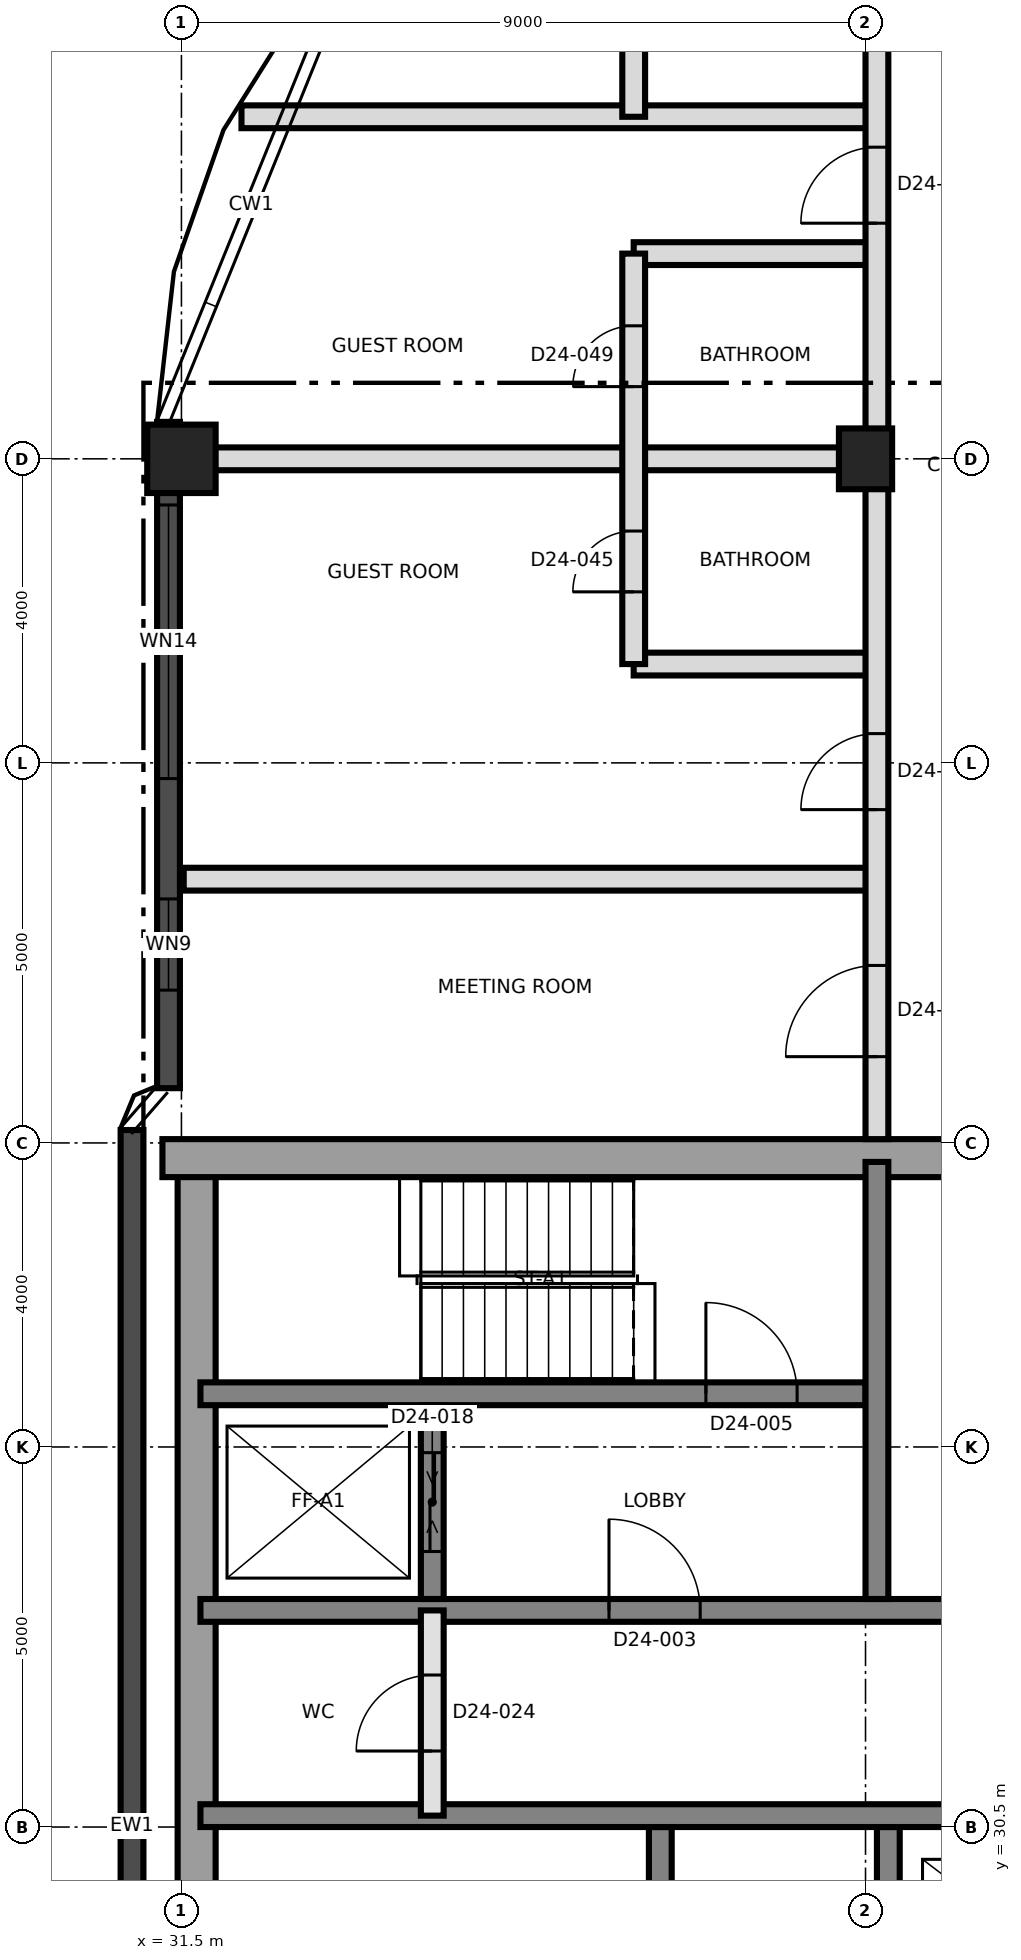
"""IFC4 building model, lengths in metres.
Left out: names, types, materials, properties, quantities, classifications, styles, units other than length and angle.
Written with IfcOpenShell. Run it as: python <this file> out.ifc"""

import sys

from ifc_helpers import new_model, si_unit, direction, frame, frame_2d, origin, origin_2d, place, context, subcontext, project, spatial, rectangle, extrude, element, fill, save


model = new_model("IFC4")
c1 = context("Model", 3, precision=1e-05, world=origin(), true_north=direction((0.0, 1.0)))
c2 = subcontext(c1, "Body", "Model", "MODEL_VIEW")
j1 = project(units=[si_unit("LENGTHUNIT", "METRE"), si_unit("PLANEANGLEUNIT", "RADIAN")], contexts=[c1])
p1 = place(None, origin())
s1 = spatial("IfcSite", under=j1, at=p1, CompositionType="ELEMENT")
p2 = place(p1, origin())
s2 = spatial("IfcBuilding", under=s1, at=p2, CompositionType="ELEMENT")
p3 = place(p2, frame((0.0, 0.0, 221.7)))
s3 = spatial("IfcBuildingStorey", under=s2, at=p3, CompositionType="ELEMENT", Elevation=221.7)
p4 = place(p3, frame((31.7, 21.75, 0.0), z_axis=(0.0, 0.0, 1.0), x_axis=(0.0, 1.0, 0.0)))
e1 = element("IfcWall", 1, at=p4, inside=s3, PredefinedType="SHEAR", context=c2, shape_type="SweptSolid", body=[
    extrude(rectangle(XDim=17.5, YDim=0.5, at=frame_2d((8.75, 0.0))), origin(), (0.0, 0.0, 1.0), 3.7),
])
p5 = place(p3, frame((31.25, 39.3, 0.0), z_axis=(0.0, 0.0, 1.0), x_axis=(1.0, 0.0, 0.0)))
e2 = element("IfcWall", 2, at=p5, inside=s3, PredefinedType="SHEAR", context=c2, shape_type="SweptSolid", body=[
    extrude(rectangle(XDim=27.0, YDim=0.5, at=frame_2d((13.5, 0.0))), origin(), (0.0, 0.0, 1.0), 3.7),
])
p6 = place(p5, frame((10.45, 0.0, 0.0)))
e3 = element("IfcOpeningElement", 3, at=p6, cuts=e2, PredefinedType="OPENING", context=c2, shape_type="SweptSolid", body=[
    extrude(rectangle(XDim=1.2, YDim=2.1, at=frame_2d((0.6, 1.05))), frame((0.0, 0.26, 0.0), z_axis=(0.0, -1.0, 0.0), x_axis=(1.0, 0.0, 0.0)), (0.0, 0.0, 1.0), 0.52),
])
p7 = place(p3, frame((37.8, 21.75, 0.0), z_axis=(0.0, 0.0, 1.0), x_axis=(0.0, 1.0, 0.0)))
e4 = element("IfcWall", 4, at=p7, inside=s3, PredefinedType="SHEAR", context=c2, shape_type="SweptSolid", body=[
    extrude(rectangle(XDim=8.75, YDim=0.3, at=frame_2d((4.375, 0.0))), origin(), (0.0, 0.0, 1.0), 3.7),
])
p8 = place(p7, frame((5.525, 0.0, 0.0)))
e5 = element("IfcOpeningElement", 5, at=p8, cuts=e4, PredefinedType="OPENING", context=c2, shape_type="SweptSolid", body=[
    extrude(rectangle(XDim=1.0, YDim=2.1, at=frame_2d((0.5, 1.05))), frame((0.0, 0.16, 0.0), z_axis=(0.0, -1.0, 0.0), x_axis=(1.0, 0.0, 0.0)), (0.0, 0.0, 1.0), 0.32),
])
p9 = place(p3, frame((40.8, 21.75, 0.0), z_axis=(0.0, 0.0, 1.0), x_axis=(0.0, 1.0, 0.0)))
e6 = element("IfcWall", 6, at=p9, inside=s3, PredefinedType="SHEAR", context=c2, shape_type="SweptSolid", body=[
    extrude(rectangle(XDim=8.75, YDim=0.3, at=frame_2d((4.375, 0.0))), origin(), (0.0, 0.0, 1.0), 3.7),
])
p10 = place(p9, frame((3.9, 0.0, 0.0)))
e7 = element("IfcOpeningElement", 7, at=p10, cuts=e6, PredefinedType="OPENING", context=c2, shape_type="SweptSolid", body=[
    extrude(rectangle(XDim=1.5, YDim=2.1, at=frame_2d((0.75, 1.05))), frame((0.0, 0.16, 0.0), z_axis=(0.0, -1.0, 0.0), x_axis=(1.0, 0.0, 0.0)), (0.0, 0.0, 1.0), 0.32),
])
p11 = place(p3, frame((31.75, 30.65, 0.0), z_axis=(0.0, 0.0, 1.0), x_axis=(1.0, 0.0, 0.0)))
e8 = element("IfcWall", 8, at=p11, inside=s3, PredefinedType="SHEAR", context=c2, shape_type="SweptSolid", body=[
    extrude(rectangle(XDim=26.5, YDim=0.3, at=frame_2d((13.25, 0.0))), origin(), (0.0, 0.0, 1.0), 3.7),
])
p12 = place(p11, frame((24.75, 0.0, 0.0)))
e9 = element("IfcOpeningElement", 9, at=p12, cuts=e8, PredefinedType="OPENING", context=c2, shape_type="SweptSolid", body=[
    extrude(rectangle(XDim=1.0, YDim=2.1, at=frame_2d((0.5, 1.05))), frame((0.0, 0.16, 0.0), z_axis=(0.0, -1.0, 0.0), x_axis=(1.0, 0.0, 0.0)), (0.0, 0.0, 1.0), 0.32),
])
p13 = place(p3, frame((31.75, 33.35, 0.0), z_axis=(0.0, 0.0, 1.0), x_axis=(1.0, 0.0, 0.0)))
e10 = element("IfcWall", 10, at=p13, inside=s3, PredefinedType="SHEAR", context=c2, shape_type="SweptSolid", body=[
    extrude(rectangle(XDim=26.5, YDim=0.3, at=frame_2d((13.25, 0.0))), origin(), (0.0, 0.0, 1.0), 3.7),
])
p14 = place(p13, frame((13.9, 0.0, 0.0)))
e11 = element("IfcOpeningElement", 11, at=p14, cuts=e10, PredefinedType="OPENING", context=c2, shape_type="SweptSolid", body=[
    extrude(rectangle(XDim=1.4, YDim=2.1, at=frame_2d((0.7, 1.05))), frame((0.0, 0.16, 0.0), z_axis=(0.0, -1.0, 0.0), x_axis=(1.0, 0.0, 0.0)), (0.0, 0.0, 1.0), 0.32),
])
p15 = place(p13, frame((5.375, 0.0, 0.0)))
e12 = element("IfcOpeningElement", 12, at=p15, cuts=e10, PredefinedType="OPENING", context=c2, shape_type="SweptSolid", body=[
    extrude(rectangle(XDim=1.2, YDim=2.1, at=frame_2d((0.6, 1.05))), frame((0.0, 0.16, 0.0), z_axis=(0.0, -1.0, 0.0), x_axis=(1.0, 0.0, 0.0)), (0.0, 0.0, 1.0), 0.32),
])
p16 = place(p13, frame((19.925, 0.0, 0.0)))
e13 = element("IfcOpeningElement", 13, at=p16, cuts=e10, PredefinedType="OPENING", context=c2, shape_type="SweptSolid", body=[
    extrude(rectangle(XDim=1.2, YDim=2.1, at=frame_2d((0.6, 1.05))), frame((0.0, 0.16, 0.0), z_axis=(0.0, -1.0, 0.0), x_axis=(1.0, 0.0, 0.0)), (0.0, 0.0, 1.0), 0.32),
])
p17 = place(p3, frame((31.75, 36.2, 0.0), z_axis=(0.0, 0.0, 1.0), x_axis=(1.0, 0.0, 0.0)))
e14 = element("IfcWall", 14, at=p17, inside=s3, PredefinedType="SHEAR", context=c2, shape_type="SweptSolid", body=[
    extrude(rectangle(XDim=8.75, YDim=0.3, at=frame_2d((4.375, 0.0))), origin(), (0.0, 0.0, 1.0), 3.7),
])
p18 = place(p17, frame((6.65, 0.0, 0.0)))
e15 = element("IfcOpeningElement", 15, at=p18, cuts=e14, PredefinedType="OPENING", context=c2, shape_type="SweptSolid", body=[
    extrude(rectangle(XDim=1.2, YDim=2.1, at=frame_2d((0.6, 1.05))), frame((0.0, 0.16, 0.0), z_axis=(0.0, -1.0, 0.0), x_axis=(1.0, 0.0, 0.0)), (0.0, 0.0, 1.0), 0.32),
])
p19 = place(p3, frame((40.65, 33.5, 0.0), z_axis=(0.0, 0.0, 1.0), x_axis=(0.0, 1.0, 0.0)))
e16 = element("IfcWall", 16, at=p19, inside=s3, PredefinedType="SHEAR", context=c2, shape_type="SweptSolid", body=[
    extrude(rectangle(XDim=5.75, YDim=0.3, at=frame_2d((2.875, 0.0))), origin(), (0.0, 0.0, 1.0), 3.7),
])
p20 = place(p3, frame((34.8, 33.5, 0.0), z_axis=(0.0, 0.0, 1.0), x_axis=(0.0, 1.0, 0.0)))
e17 = element("IfcWall", 17, at=p20, inside=s3, PredefinedType="SHEAR", context=c2, shape_type="SweptSolid", body=[
    extrude(rectangle(XDim=2.55, YDim=0.3, at=frame_2d((1.275, 0.0))), origin(), (0.0, 0.0, 1.0), 3.7),
])
p21 = place(p20, frame((0.625, 0.0, 0.0)))
e18 = element("IfcOpeningElement", 18, at=p21, cuts=e17, PredefinedType="OPENING", context=c2, shape_type="SweptSolid", body=[
    extrude(rectangle(XDim=1.3, YDim=2.4, at=frame_2d((0.65, 1.2))), frame((0.0, 0.16, 0.0), z_axis=(0.0, -1.0, 0.0), x_axis=(1.0, 0.0, 0.0)), (0.0, 0.0, 1.0), 0.32),
])
p22 = place(p3, frame((31.5, 48.5, 0.0), z_axis=(0.0, 0.0, 1.0), x_axis=(1.0, 0.0, 0.0)))
e19 = element("IfcColumn", 19, at=p22, inside=s3, PredefinedType="COLUMN", context=c2, shape_type="SweptSolid", body=[
    extrude(rectangle(XDim=0.9, YDim=0.9, at=origin_2d()), origin(), (0.0, 0.0, 1.0), 3.7),
])
p23 = place(p3, frame((40.5, 48.5, 0.0), z_axis=(0.0, 0.0, 1.0), x_axis=(0.0, 1.0, 0.0)))
e20 = element("IfcColumn", 20, at=p23, inside=s3, PredefinedType="COLUMN", context=c2, shape_type="SweptSolid", body=[
    extrude(rectangle(XDim=0.8, YDim=0.7, at=origin_2d()), origin(), (0.0, 0.0, 1.0), 3.7),
])
p24 = place(p3, frame((31.33, 48.986, 0.0), z_axis=(0.0, 0.0, 1.0), x_axis=(0.0, -1.0, 0.0)))
e21 = element("IfcWall", 21, at=p24, inside=s3, PredefinedType="SOLIDWALL", context=c2, shape_type="SweptSolid", body=[
    extrude(rectangle(XDim=8.766, YDim=0.3, at=frame_2d((4.383, 0.0))), origin(), (0.0, 0.0, 1.0), 3.4),
])
p25 = place(p24, frame((1.093, 0.0, 0.9)))
e22 = element("IfcOpeningElement", 22, at=p25, cuts=e21, PredefinedType="OPENING", context=c2, shape_type="SweptSolid", body=[
    extrude(rectangle(XDim=3.6, YDim=1.7, at=frame_2d((1.8, 0.85))), frame((0.0, 0.16, 0.0), z_axis=(0.0, -1.0, 0.0), x_axis=(1.0, 0.0, 0.0)), (0.0, 0.0, 1.0), 0.32),
])
p26 = place(p24, frame((6.276, 0.0, 0.9)))
e23 = element("IfcOpeningElement", 23, at=p26, cuts=e21, PredefinedType="OPENING", context=c2, shape_type="SweptSolid", body=[
    extrude(rectangle(XDim=1.2, YDim=1.5, at=frame_2d((0.6, 0.75))), frame((0.0, 0.16, 0.0), z_axis=(0.0, -1.0, 0.0), x_axis=(1.0, 0.0, 0.0)), (0.0, 0.0, 1.0), 0.32),
])
p27 = place(p3, frame((30.85, 39.67, 0.0), z_axis=(0.0, 0.0, 1.0), x_axis=(0.0, -1.0, 0.0)))
e24 = element("IfcWall", 24, at=p27, inside=s3, PredefinedType="SOLIDWALL", context=c2, shape_type="SweptSolid", body=[
    extrude(rectangle(XDim=18.31, YDim=0.3, at=frame_2d((9.155, 0.0))), origin(), (0.0, 0.0, 1.0), 3.4),
])
p28 = place(p3, frame((34.8, 30.65, 0.0), z_axis=(0.0, 0.0, 1.0), x_axis=(0.0, 1.0, 0.0)))
e25 = element("IfcWall", 25, at=p28, inside=s3, PredefinedType="SOLIDWALL", context=c2, shape_type="SweptSolid", body=[
    extrude(rectangle(XDim=2.7, YDim=0.3, at=frame_2d((1.35, 0.0))), origin(), (0.0, 0.0, 1.0), 3.4),
])
p29 = place(p28, frame((0.85, 0.0, 0.0)))
e26 = element("IfcOpeningElement", 26, at=p29, cuts=e25, PredefinedType="OPENING", context=c2, shape_type="SweptSolid", body=[
    extrude(rectangle(XDim=1.0, YDim=2.1, at=frame_2d((0.5, 1.05))), frame((0.0, 0.16, 0.0), z_axis=(0.0, -1.0, 0.0), x_axis=(1.0, 0.0, 0.0)), (0.0, 0.0, 1.0), 0.32),
])
p30 = place(p3, frame((31.53, 42.97, 0.0), z_axis=(0.0, 0.0, 1.0), x_axis=(1.0, 0.0, 0.0)))
e27 = element("IfcWall", 27, at=p30, inside=s3, PredefinedType="PARTITIONING", context=c2, shape_type="SweptSolid", body=[
    extrude(rectangle(XDim=9.12, YDim=0.3, at=frame_2d((4.56, 0.0))), origin(), (0.0, 0.0, 1.0), 3.4),
])
p31 = place(p3, frame((37.45, 45.8, 0.0), z_axis=(0.0, 0.0, 1.0), x_axis=(1.0, 0.0, 0.0)))
e28 = element("IfcWall", 28, at=p31, inside=s3, PredefinedType="PARTITIONING", context=c2, shape_type="SweptSolid", body=[
    extrude(rectangle(XDim=3.2, YDim=0.3, at=frame_2d((1.6, 0.0))), origin(), (0.0, 0.0, 1.0), 3.4),
])
p32 = place(p3, frame((31.53, 48.5, 0.0), z_axis=(0.0, 0.0, 1.0), x_axis=(1.0, 0.0, 0.0)))
e29 = element("IfcWall", 29, at=p32, inside=s3, PredefinedType="PARTITIONING", context=c2, shape_type="SweptSolid", body=[
    extrude(rectangle(XDim=9.12, YDim=0.3, at=frame_2d((4.56, 0.0))), origin(), (0.0, 0.0, 1.0), 3.4),
])
p33 = place(p3, frame((37.45, 51.2, 0.0), z_axis=(0.0, 0.0, 1.0), x_axis=(1.0, 0.0, 0.0)))
e30 = element("IfcWall", 30, at=p33, inside=s3, PredefinedType="PARTITIONING", context=c2, shape_type="SweptSolid", body=[
    extrude(rectangle(XDim=3.2, YDim=0.3, at=frame_2d((1.6, 0.0))), origin(), (0.0, 0.0, 1.0), 3.4),
])
p34 = place(p3, frame((32.29, 53.0, 0.0), z_axis=(0.0, 0.0, 1.0), x_axis=(1.0, 0.0, 0.0)))
e31 = element("IfcWall", 31, at=p34, inside=s3, PredefinedType="PARTITIONING", context=c2, shape_type="SweptSolid", body=[
    extrude(rectangle(XDim=8.36, YDim=0.3, at=frame_2d((4.18, 0.0))), origin(), (0.0, 0.0, 1.0), 3.4),
])
p35 = place(p3, frame((37.45, 45.8, 0.0), z_axis=(0.0, 0.0, 1.0), x_axis=(0.0, 1.0, 0.0)))
e32 = element("IfcWall", 32, at=p35, inside=s3, PredefinedType="PARTITIONING", context=c2, shape_type="SweptSolid", body=[
    extrude(rectangle(XDim=5.4, YDim=0.3, at=frame_2d((2.7, 0.0))), origin(), (0.0, 0.0, 1.0), 3.4),
])
p36 = place(p35, frame((0.95, 0.0, 0.0)))
e33 = element("IfcOpeningElement", 33, at=p36, cuts=e32, PredefinedType="OPENING", context=c2, shape_type="SweptSolid", body=[
    extrude(rectangle(XDim=0.8, YDim=2.1, at=frame_2d((0.4, 1.05))), frame((0.0, 0.16, 0.0), z_axis=(0.0, -1.0, 0.0), x_axis=(1.0, 0.0, 0.0)), (0.0, 0.0, 1.0), 0.32),
])
p37 = place(p35, frame((3.65, 0.0, 0.0)))
e34 = element("IfcOpeningElement", 34, at=p37, cuts=e32, PredefinedType="OPENING", context=c2, shape_type="SweptSolid", body=[
    extrude(rectangle(XDim=0.8, YDim=2.1, at=frame_2d((0.4, 1.05))), frame((0.0, 0.16, 0.0), z_axis=(0.0, -1.0, 0.0), x_axis=(1.0, 0.0, 0.0)), (0.0, 0.0, 1.0), 0.32),
])
p38 = place(p3, frame((37.45, 53.0, 0.0), z_axis=(0.0, 0.0, 1.0), x_axis=(0.0, 1.0, 0.0)))
e35 = element("IfcWall", 35, at=p38, inside=s3, PredefinedType="PARTITIONING", context=c2, shape_type="SweptSolid", body=[
    extrude(rectangle(XDim=2.7, YDim=0.3, at=frame_2d((1.35, 0.0))), origin(), (0.0, 0.0, 1.0), 3.4),
])
p39 = place(p38, frame((0.95, 0.0, 0.0)))
e36 = element("IfcOpeningElement", 36, at=p39, cuts=e35, PredefinedType="OPENING", context=c2, shape_type="SweptSolid", body=[
    extrude(rectangle(XDim=0.8, YDim=2.1, at=frame_2d((0.4, 1.05))), frame((0.0, 0.16, 0.0), z_axis=(0.0, -1.0, 0.0), x_axis=(1.0, 0.0, 0.0)), (0.0, 0.0, 1.0), 0.32),
])
p40 = place(p3, frame((40.65, 39.55, 0.0), z_axis=(0.0, 0.0, 1.0), x_axis=(0.0, 1.0, 0.0)))
e37 = element("IfcWall", 37, at=p40, inside=s3, PredefinedType="PARTITIONING", context=c2, shape_type="SweptSolid", body=[
    extrude(rectangle(XDim=17.92, YDim=0.3, at=frame_2d((8.96, 0.0))), origin(), (0.0, 0.0, 1.0), 3.4),
])
p41 = place(p40, frame((1.085, 0.0, 0.0)))
e38 = element("IfcOpeningElement", 38, at=p41, cuts=e37, PredefinedType="OPENING", context=c2, shape_type="SweptSolid", body=[
    extrude(rectangle(XDim=1.2, YDim=2.1, at=frame_2d((0.6, 1.05))), frame((0.0, 0.16, 0.0), z_axis=(0.0, -1.0, 0.0), x_axis=(1.0, 0.0, 0.0)), (0.0, 0.0, 1.0), 0.32),
])
p42 = place(p40, frame((4.335, 0.0, 0.0)))
e39 = element("IfcOpeningElement", 39, at=p42, cuts=e37, PredefinedType="OPENING", context=c2, shape_type="SweptSolid", body=[
    extrude(rectangle(XDim=1.0, YDim=2.1, at=frame_2d((0.5, 1.05))), frame((0.0, 0.16, 0.0), z_axis=(0.0, -1.0, 0.0), x_axis=(1.0, 0.0, 0.0)), (0.0, 0.0, 1.0), 0.32),
])
p43 = place(p40, frame((12.05, 0.0, 0.0)))
e40 = element("IfcOpeningElement", 40, at=p43, cuts=e37, PredefinedType="OPENING", context=c2, shape_type="SweptSolid", body=[
    extrude(rectangle(XDim=1.0, YDim=2.1, at=frame_2d((0.5, 1.05))), frame((0.0, 0.16, 0.0), z_axis=(0.0, -1.0, 0.0), x_axis=(1.0, 0.0, 0.0)), (0.0, 0.0, 1.0), 0.32),
])
p44 = place(p40, frame((16.45, 0.0, 0.0)))
e41 = element("IfcOpeningElement", 41, at=p44, cuts=e37, PredefinedType="OPENING", context=c2, shape_type="SweptSolid", body=[
    extrude(rectangle(XDim=1.0, YDim=2.1, at=frame_2d((0.5, 1.05))), frame((0.0, 0.16, 0.0), z_axis=(0.0, -1.0, 0.0), x_axis=(1.0, 0.0, 0.0)), (0.0, 0.0, 1.0), 0.32),
])
p45 = place(p25, origin())
e42 = element("IfcWindow", 42, at=p45, inside=s3, PartitioningType="SINGLE_PANEL", PredefinedType="WINDOW", context=c2, shape_type="SweptSolid", body=[
    extrude(rectangle(XDim=3.6, YDim=1.7, at=frame_2d((1.8, 0.85))), frame((0.0, 0.03, 0.0), z_axis=(0.0, -1.0, 0.0), x_axis=(1.0, 0.0, 0.0)), (0.0, 0.0, 1.0), 0.06),
])
fill(e22, e42)
p46 = place(p26, origin())
e43 = element("IfcWindow", 43, at=p46, inside=s3, PartitioningType="SINGLE_PANEL", PredefinedType="WINDOW", context=c2, shape_type="SweptSolid", body=[
    extrude(rectangle(XDim=1.2, YDim=1.5, at=frame_2d((0.6, 0.75))), frame((0.0, 0.03, 0.0), z_axis=(0.0, -1.0, 0.0), x_axis=(1.0, 0.0, 0.0)), (0.0, 0.0, 1.0), 0.06),
])
fill(e23, e43)
p47 = place(p15, origin())
e44 = element("IfcDoor", 44, at=p47, inside=s3, OperationType="SINGLE_SWING_LEFT", PredefinedType="DOOR", context=c2, shape_type="SweptSolid", body=[
    extrude(rectangle(XDim=1.2, YDim=2.1, at=frame_2d((0.6, 1.05))), frame((0.0, 0.025, 0.0), z_axis=(0.0, -1.0, 0.0), x_axis=(1.0, 0.0, 0.0)), (0.0, 0.0, 1.0), 0.05),
])
fill(e12, e44)
p48 = place(p18, origin())
e45 = element("IfcDoor", 45, at=p48, inside=s3, OperationType="SINGLE_SWING_RIGHT", PredefinedType="DOOR", context=c2, shape_type="SweptSolid", body=[
    extrude(rectangle(XDim=1.2, YDim=2.1, at=frame_2d((0.6, 1.05))), frame((0.0, 0.025, 0.0), z_axis=(0.0, -1.0, 0.0), x_axis=(1.0, 0.0, 0.0)), (0.0, 0.0, 1.0), 0.05),
])
fill(e15, e45)
p49 = place(p21, origin())
e46 = element("IfcDoor", 46, at=p49, inside=s3, OperationType="SLIDING_TO_LEFT", PredefinedType="DOOR", context=c2, shape_type="SweptSolid", body=[
    extrude(rectangle(XDim=1.3, YDim=2.4, at=frame_2d((0.65, 1.2))), frame((0.0, 0.025, 0.0), z_axis=(0.0, -1.0, 0.0), x_axis=(1.0, 0.0, 0.0)), (0.0, 0.0, 1.0), 0.05),
])
fill(e18, e46)
p50 = place(p29, origin())
e47 = element("IfcDoor", 47, at=p50, inside=s3, OperationType="SINGLE_SWING_LEFT", PredefinedType="DOOR", context=c2, shape_type="SweptSolid", body=[
    extrude(rectangle(XDim=1.0, YDim=2.1, at=frame_2d((0.5, 1.05))), frame((0.0, 0.025, 0.0), z_axis=(0.0, -1.0, 0.0), x_axis=(1.0, 0.0, 0.0)), (0.0, 0.0, 1.0), 0.05),
])
fill(e26, e47)
p51 = place(p41, origin())
e48 = element("IfcDoor", 48, at=p51, inside=s3, OperationType="SINGLE_SWING_LEFT", PredefinedType="DOOR", context=c2, shape_type="SweptSolid", body=[
    extrude(rectangle(XDim=1.2, YDim=2.1, at=frame_2d((0.6, 1.05))), frame((0.0, 0.025, 0.0), z_axis=(0.0, -1.0, 0.0), x_axis=(1.0, 0.0, 0.0)), (0.0, 0.0, 1.0), 0.05),
])
fill(e38, e48)
p52 = place(p36, origin())
e49 = element("IfcDoor", 49, at=p52, inside=s3, OperationType="SINGLE_SWING_LEFT", PredefinedType="DOOR", context=c2, shape_type="SweptSolid", body=[
    extrude(rectangle(XDim=0.8, YDim=2.1, at=frame_2d((0.4, 1.05))), frame((0.0, 0.025, 0.0), z_axis=(0.0, -1.0, 0.0), x_axis=(1.0, 0.0, 0.0)), (0.0, 0.0, 1.0), 0.05),
])
fill(e33, e49)
p53 = place(p42, origin())
e50 = element("IfcDoor", 50, at=p53, inside=s3, OperationType="SINGLE_SWING_RIGHT", PredefinedType="DOOR", context=c2, shape_type="SweptSolid", body=[
    extrude(rectangle(XDim=1.0, YDim=2.1, at=frame_2d((0.5, 1.05))), frame((0.0, 0.025, 0.0), z_axis=(0.0, -1.0, 0.0), x_axis=(1.0, 0.0, 0.0)), (0.0, 0.0, 1.0), 0.05),
])
fill(e39, e50)
p54 = place(p37, origin())
e51 = element("IfcDoor", 51, at=p54, inside=s3, OperationType="SINGLE_SWING_LEFT", PredefinedType="DOOR", context=c2, shape_type="SweptSolid", body=[
    extrude(rectangle(XDim=0.8, YDim=2.1, at=frame_2d((0.4, 1.05))), frame((0.0, 0.025, 0.0), z_axis=(0.0, -1.0, 0.0), x_axis=(1.0, 0.0, 0.0)), (0.0, 0.0, 1.0), 0.05),
])
fill(e34, e51)
p55 = place(p43, origin())
e52 = element("IfcDoor", 52, at=p55, inside=s3, OperationType="SINGLE_SWING_LEFT", PredefinedType="DOOR", context=c2, shape_type="SweptSolid", body=[
    extrude(rectangle(XDim=1.0, YDim=2.1, at=frame_2d((0.5, 1.05))), frame((0.0, 0.025, 0.0), z_axis=(0.0, -1.0, 0.0), x_axis=(1.0, 0.0, 0.0)), (0.0, 0.0, 1.0), 0.05),
])
fill(e40, e52)
save(model, sys.argv[1])
